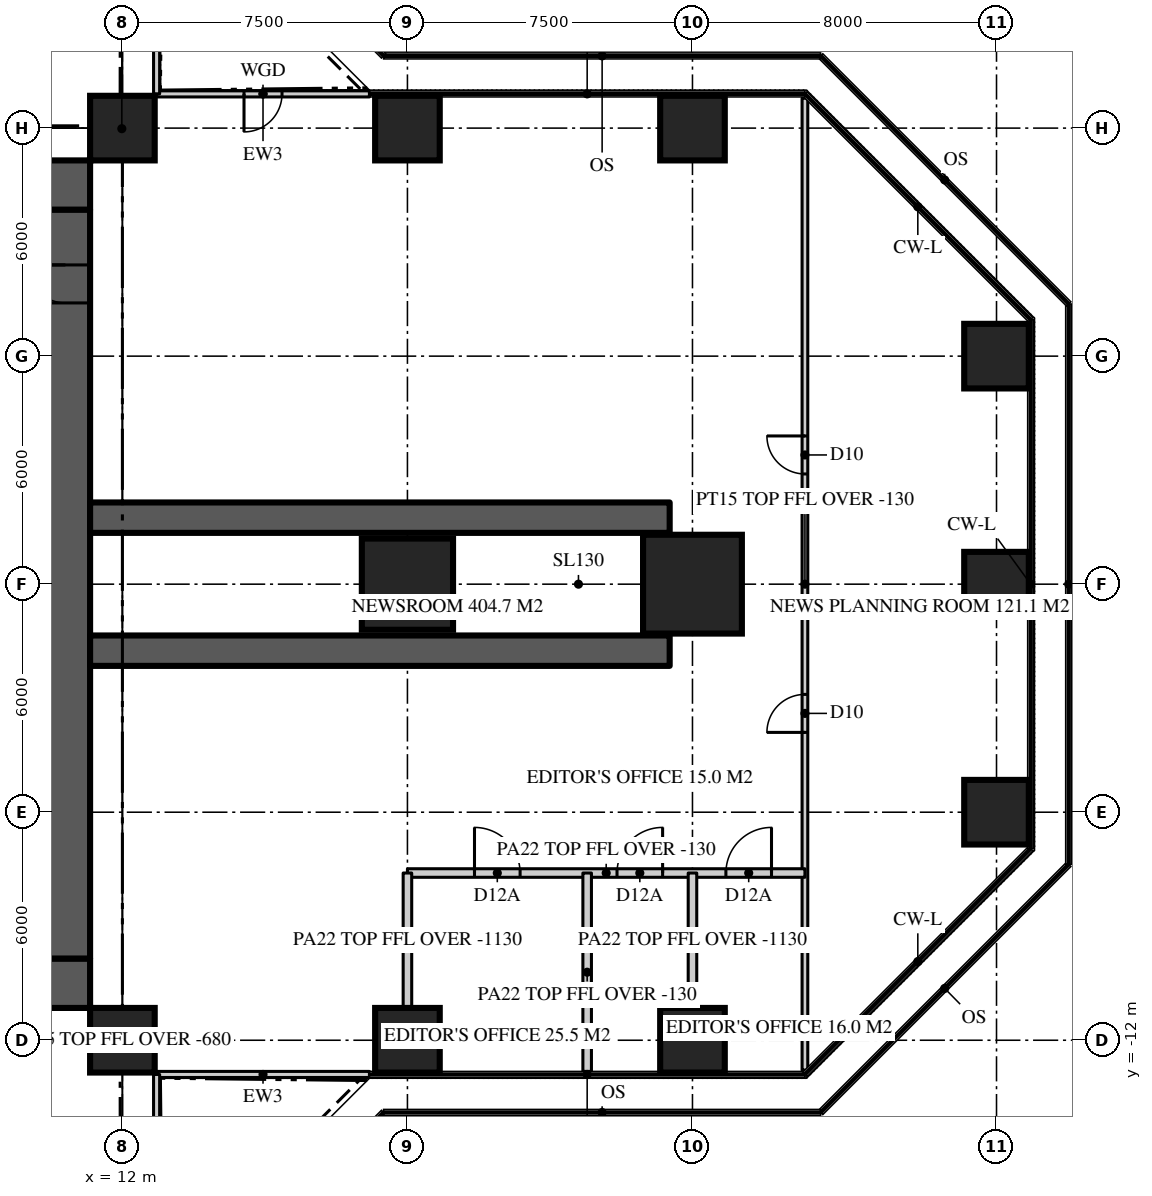
"""IFC4 building model, lengths in metres.
Left out: names, types, materials, properties, quantities, classifications, styles, units other than length and angle.
Written with IfcOpenShell. Run it as: python <this file> out.ifc"""

import sys

from ifc_helpers import new_model, si_unit, direction, frame, frame_2d, origin, origin_2d, place, context, subcontext, project, spatial, rectangle, extrude, element, fill, save


model = new_model("IFC4")
c1 = context("Model", 3, precision=1e-05, world=origin(), true_north=direction((0.0, 1.0)))
c2 = subcontext(c1, "Body", "Model", "MODEL_VIEW")
j1 = project(units=[si_unit("LENGTHUNIT", "METRE"), si_unit("PLANEANGLEUNIT", "RADIAN")], contexts=[c1])
p1 = place(None, origin())
s1 = spatial("IfcSite", under=j1, at=p1, CompositionType="ELEMENT")
p2 = place(p1, origin())
s2 = spatial("IfcBuilding", under=s1, at=p2, CompositionType="ELEMENT")
p3 = place(p2, frame((0.0, 0.0, 43.5)))
s3 = spatial("IfcBuildingStorey", under=s2, at=p3, CompositionType="ELEMENT", Elevation=43.5)
p4 = place(p3, frame((-11.15, 10.5, 0.0), z_axis=(0.0, 0.0, 1.0), x_axis=(1.0, 0.0, 0.0)))
e1 = element("IfcWall", 1, at=p4, inside=s3, PredefinedType="SHEAR", context=c2, shape_type="SweptSolid", body=[
    extrude(rectangle(XDim=22.3, YDim=1.3, at=frame_2d((11.15, 0.0))), origin(), (0.0, 0.0, 1.0), 3.9),
])
p5 = place(p4, frame((4.25, 0.0, 0.0)))
e2 = element("IfcOpeningElement", 2, at=p5, cuts=e1, PredefinedType="OPENING", context=c2, shape_type="SweptSolid", body=[
    extrude(rectangle(XDim=1.8, YDim=2.2, at=frame_2d((0.9, 1.1))), frame((0.0, 0.66, 0.0), z_axis=(0.0, -1.0, 0.0), x_axis=(1.0, 0.0, 0.0)), (0.0, 0.0, 1.0), 1.32),
])
p6 = place(p4, frame((16.25, 0.0, 0.0)))
e3 = element("IfcOpeningElement", 3, at=p6, cuts=e1, PredefinedType="OPENING", context=c2, shape_type="SweptSolid", body=[
    extrude(rectangle(XDim=1.8, YDim=2.2, at=frame_2d((0.9, 1.1))), frame((0.0, 0.66, 0.0), z_axis=(0.0, -1.0, 0.0), x_axis=(1.0, 0.0, 0.0)), (0.0, 0.0, 1.0), 1.32),
])
p7 = place(p3, frame((11.15, -10.5, 0.0), z_axis=(0.0, 0.0, 1.0), x_axis=(-1.0, 0.0, 0.0)))
e4 = element("IfcWall", 4, at=p7, inside=s3, PredefinedType="SHEAR", context=c2, shape_type="SweptSolid", body=[
    extrude(rectangle(XDim=22.3, YDim=1.3, at=frame_2d((11.15, 0.0))), origin(), (0.0, 0.0, 1.0), 3.9),
])
p8 = place(p7, frame((16.25, 0.0, 0.0)))
e5 = element("IfcOpeningElement", 5, at=p8, cuts=e4, PredefinedType="OPENING", context=c2, shape_type="SweptSolid", body=[
    extrude(rectangle(XDim=1.8, YDim=2.2, at=frame_2d((0.9, 1.1))), frame((0.0, 0.66, 0.0), z_axis=(0.0, -1.0, 0.0), x_axis=(1.0, 0.0, 0.0)), (0.0, 0.0, 1.0), 1.32),
])
p9 = place(p7, frame((4.25, 0.0, 0.0)))
e6 = element("IfcOpeningElement", 6, at=p9, cuts=e4, PredefinedType="OPENING", context=c2, shape_type="SweptSolid", body=[
    extrude(rectangle(XDim=1.8, YDim=2.2, at=frame_2d((0.9, 1.1))), frame((0.0, 0.66, 0.0), z_axis=(0.0, -1.0, 0.0), x_axis=(1.0, 0.0, 0.0)), (0.0, 0.0, 1.0), 1.32),
])
p10 = place(p3, frame((10.5, -9.85, 0.0), z_axis=(0.0, 0.0, 1.0), x_axis=(0.0, 1.0, 0.0)))
e7 = element("IfcWall", 7, at=p10, inside=s3, PredefinedType="SHEAR", context=c2, shape_type="SweptSolid", body=[
    extrude(rectangle(XDim=19.7, YDim=1.3, at=frame_2d((9.85, 0.0))), origin(), (0.0, 0.0, 1.0), 3.9),
])
p11 = place(p10, frame((17.25, 0.0, 0.0)))
e8 = element("IfcOpeningElement", 8, at=p11, cuts=e7, PredefinedType="OPENING", context=c2, shape_type="SweptSolid", body=[
    extrude(rectangle(XDim=1.0, YDim=2.2, at=frame_2d((0.5, 1.1))), frame((0.0, 0.66, 0.0), z_axis=(0.0, -1.0, 0.0), x_axis=(1.0, 0.0, 0.0)), (0.0, 0.0, 1.0), 1.32),
])
for number, where, z_axis, x_axis in (
    (9, (11.15, -1.75, 0.0), (0.0, 0.0, 1.0), (1.0, 0.0, 0.0)),
    (10, (11.15, 1.75, 0.0), (0.0, 0.0, 1.0), (1.0, 0.0, 0.0)),
):
    element("IfcWall", number, at=place(p3, frame(where, z_axis=z_axis, x_axis=x_axis)), inside=s3, PredefinedType="SHEAR", context=c2, shape_type="SweptSolid", body=[
        extrude(rectangle(XDim=15.25, YDim=0.8, at=frame_2d((7.625, 0.0))), origin(), (0.0, 0.0, 1.0), 3.9),
    ])
for number, where, z_axis, x_axis in (
    (11, (12.0, -12.0, 0.0), (0.0, 0.0, 1.0), (1.0, 0.0, 0.0)),
    (12, (19.5, -12.0, 0.0), (0.0, 0.0, 1.0), (1.0, 0.0, 0.0)),
    (13, (27.0, -12.0, 0.0), (0.0, 0.0, 1.0), (1.0, 0.0, 0.0)),
    (14, (35.0, -6.0, 0.0), (0.0, 0.0, 1.0), (1.0, 0.0, 0.0)),
):
    element("IfcColumn", number, at=place(p3, frame(where, z_axis=z_axis, x_axis=x_axis)), inside=s3, PredefinedType="COLUMN", context=c2, shape_type="SweptSolid", body=[
        extrude(rectangle(XDim=1.7, YDim=1.7, at=origin_2d()), origin(), (0.0, 0.0, 1.0), 3.9),
    ])
p12 = place(p3, frame((19.5, 0.0, 0.0), z_axis=(0.0, 0.0, 1.0), x_axis=(1.0, 0.0, 0.0)))
e15 = element("IfcColumn", 15, at=p12, inside=s3, PredefinedType="COLUMN", context=c2, shape_type="SweptSolid", body=[
    extrude(rectangle(XDim=2.4, YDim=2.4, at=origin_2d()), origin(), (0.0, 0.0, 1.0), 3.9),
])
p13 = place(p3, frame((27.0, 0.0, 0.0), z_axis=(0.0, 0.0, 1.0), x_axis=(1.0, 0.0, 0.0)))
e16 = element("IfcColumn", 16, at=p13, inside=s3, PredefinedType="COLUMN", context=c2, shape_type="SweptSolid", body=[
    extrude(rectangle(XDim=2.6, YDim=2.6, at=origin_2d()), origin(), (0.0, 0.0, 1.0), 3.9),
])
for number, where, z_axis, x_axis in (
    (17, (35.0, 0.0, 0.0), (0.0, 0.0, 1.0), (1.0, 0.0, 0.0)),
    (18, (35.0, 6.0, 0.0), (0.0, 0.0, 1.0), (1.0, 0.0, 0.0)),
    (19, (12.0, 12.0, 0.0), (0.0, 0.0, 1.0), (1.0, 0.0, 0.0)),
    (20, (19.5, 12.0, 0.0), (0.0, 0.0, 1.0), (1.0, 0.0, 0.0)),
    (21, (27.0, 12.0, 0.0), (0.0, 0.0, 1.0), (1.0, 0.0, 0.0)),
):
    element("IfcColumn", number, at=place(p3, frame(where, z_axis=z_axis, x_axis=x_axis)), inside=s3, PredefinedType="COLUMN", context=c2, shape_type="SweptSolid", body=[
        extrude(rectangle(XDim=1.7, YDim=1.7, at=origin_2d()), origin(), (0.0, 0.0, 1.0), 3.9),
    ])
p14 = place(p3, frame((12.9, -12.9, 0.0), z_axis=(0.0, 0.0, 1.0), x_axis=(1.0, 0.0, 0.0)))
e22 = element("IfcWall", 22, at=p14, inside=s3, PredefinedType="SOLIDWALL", context=c2, shape_type="SweptSolid", body=[
    extrude(rectangle(XDim=5.6, YDim=0.16, at=frame_2d((2.8, 0.0))), origin(), (0.0, 0.0, 1.0), 3.77),
])
p15 = place(p3, frame((18.5, 12.9, 0.0), z_axis=(0.0, 0.0, 1.0), x_axis=(-1.0, 0.0, 0.0)))
e23 = element("IfcWall", 23, at=p15, inside=s3, PredefinedType="SOLIDWALL", context=c2, shape_type="SweptSolid", body=[
    extrude(rectangle(XDim=5.6, YDim=0.16, at=frame_2d((2.8, 0.0))), origin(), (0.0, 0.0, 1.0), 3.77),
])
p16 = place(p15, frame((2.3, 0.0, 0.0)))
e24 = element("IfcOpeningElement", 24, at=p16, cuts=e23, PredefinedType="OPENING", context=c2, shape_type="SweptSolid", body=[
    extrude(rectangle(XDim=1.0, YDim=2.2, at=frame_2d((0.5, 1.1))), frame((0.0, 0.09, 0.0), z_axis=(0.0, -1.0, 0.0), x_axis=(1.0, 0.0, 0.0)), (0.0, 0.0, 1.0), 0.18),
])
p17 = place(p3, frame((12.9, 12.9, 0.0), z_axis=(0.0, 0.0, 1.0), x_axis=(0.0, 1.0, 0.0)))
e25 = element("IfcWall", 25, at=p17, inside=s3, PredefinedType="SOLIDWALL", context=c2, shape_type="SweptSolid", body=[
    extrude(rectangle(XDim=5.6, YDim=0.16, at=frame_2d((2.8, 0.0))), origin(), (0.0, 0.0, 1.0), 3.77),
])
p18 = place(p3, frame((12.9, -18.5, 0.0), z_axis=(0.0, 0.0, 1.0), x_axis=(0.0, 1.0, 0.0)))
e26 = element("IfcWall", 26, at=p18, inside=s3, PredefinedType="SOLIDWALL", context=c2, shape_type="SweptSolid", body=[
    extrude(rectangle(XDim=5.6, YDim=0.16, at=frame_2d((2.8, 0.0))), origin(), (0.0, 0.0, 1.0), 3.77),
])
p19 = place(p18, frame((2.3, 0.0, 0.0)))
e27 = element("IfcOpeningElement", 27, at=p19, cuts=e26, PredefinedType="OPENING", context=c2, shape_type="SweptSolid", body=[
    extrude(rectangle(XDim=1.0, YDim=2.2, at=frame_2d((0.5, 1.1))), frame((0.0, 0.09, 0.0), z_axis=(0.0, -1.0, 0.0), x_axis=(1.0, 0.0, 0.0)), (0.0, 0.0, 1.0), 0.18),
])
p20 = place(p3, frame((29.959, -12.786, 0.0), z_axis=(0.0, 0.0, 1.0), x_axis=(0.0, 1.0, 0.0)))
e28 = element("IfcWall", 28, at=p20, inside=s3, PredefinedType="PARTITIONING", context=c2, shape_type="SweptSolid", body=[
    extrude(rectangle(XDim=25.573, YDim=0.15, at=frame_2d((12.786, 0.0))), origin(), (0.0, 0.0, 1.0), 3.77),
])
p21 = place(p20, frame((15.687, 0.0, 0.0)))
e29 = element("IfcOpeningElement", 29, at=p21, cuts=e28, PredefinedType="OPENING", context=c2, shape_type="SweptSolid", body=[
    extrude(rectangle(XDim=1.0, YDim=2.2, at=frame_2d((0.5, 1.1))), frame((0.0, 0.085, 0.0), z_axis=(0.0, -1.0, 0.0), x_axis=(1.0, 0.0, 0.0)), (0.0, 0.0, 1.0), 0.17),
])
p22 = place(p20, frame((8.886, 0.0, 0.0)))
e30 = element("IfcOpeningElement", 30, at=p22, cuts=e28, PredefinedType="OPENING", context=c2, shape_type="SweptSolid", body=[
    extrude(rectangle(XDim=1.0, YDim=2.2, at=frame_2d((0.5, 1.1))), frame((0.0, 0.085, 0.0), z_axis=(0.0, -1.0, 0.0), x_axis=(1.0, 0.0, 0.0)), (0.0, 0.0, 1.0), 0.17),
])
p23 = place(p3, frame((19.5, -7.6, 0.0), z_axis=(0.0, 0.0, 1.0), x_axis=(1.0, 0.0, 0.0)))
e31 = element("IfcWall", 31, at=p23, inside=s3, PredefinedType="PARTITIONING", context=c2, shape_type="SweptSolid", body=[
    extrude(rectangle(XDim=10.459, YDim=0.225, at=frame_2d((5.229, 0.0))), origin(), (0.0, 0.0, 1.0), 3.77),
])
p24 = place(p23, frame((1.764, 0.0, 0.0)))
e32 = element("IfcOpeningElement", 32, at=p24, cuts=e31, PredefinedType="OPENING", context=c2, shape_type="SweptSolid", body=[
    extrude(rectangle(XDim=1.2, YDim=2.2, at=frame_2d((0.6, 1.1))), frame((0.0, 0.123, 0.0), z_axis=(0.0, -1.0, 0.0), x_axis=(1.0, 0.0, 0.0)), (0.0, 0.0, 1.0), 0.245),
])
p25 = place(p23, frame((5.514, 0.0, 0.0)))
e33 = element("IfcOpeningElement", 33, at=p25, cuts=e31, PredefinedType="OPENING", context=c2, shape_type="SweptSolid", body=[
    extrude(rectangle(XDim=1.2, YDim=2.2, at=frame_2d((0.6, 1.1))), frame((0.0, 0.123, 0.0), z_axis=(0.0, -1.0, 0.0), x_axis=(1.0, 0.0, 0.0)), (0.0, 0.0, 1.0), 0.245),
])
p26 = place(p23, frame((8.379, 0.0, 0.0)))
e34 = element("IfcOpeningElement", 34, at=p26, cuts=e31, PredefinedType="OPENING", context=c2, shape_type="SweptSolid", body=[
    extrude(rectangle(XDim=1.2, YDim=2.2, at=frame_2d((0.6, 1.1))), frame((0.0, 0.123, 0.0), z_axis=(0.0, -1.0, 0.0), x_axis=(1.0, 0.0, 0.0)), (0.0, 0.0, 1.0), 0.245),
])
p27 = place(p3, frame((19.5, -7.6, 0.0), z_axis=(0.0, 0.0, 1.0), x_axis=(0.0, -1.0, 0.0)))
e35 = element("IfcWall", 35, at=p27, inside=s3, PredefinedType="PARTITIONING", context=c2, shape_type="SweptSolid", body=[
    extrude(rectangle(XDim=3.55, YDim=0.225, at=frame_2d((1.775, 0.0))), origin(), (0.0, 0.0, 1.0), 2.77),
])
p28 = place(p3, frame((24.229, -7.6, 0.0), z_axis=(0.0, 0.0, 1.0), x_axis=(0.0, -1.0, 0.0)))
e36 = element("IfcWall", 36, at=p28, inside=s3, PredefinedType="PARTITIONING", context=c2, shape_type="SweptSolid", body=[
    extrude(rectangle(XDim=5.22, YDim=0.225, at=frame_2d((2.61, 0.0))), origin(), (0.0, 0.0, 1.0), 3.77),
])
p29 = place(p3, frame((27.0, -7.6, 0.0), z_axis=(0.0, 0.0, 1.0), x_axis=(0.0, -1.0, 0.0)))
e37 = element("IfcWall", 37, at=p29, inside=s3, PredefinedType="PARTITIONING", context=c2, shape_type="SweptSolid", body=[
    extrude(rectangle(XDim=3.55, YDim=0.225, at=frame_2d((1.775, 0.0))), origin(), (0.0, 0.0, 1.0), 2.77),
])
for number, where, z_axis, x_axis in (
    (38, (11.15, 11.15, 0.0), (0.0, 0.0, 1.0), (0.707, 0.707, 0.0)),
    (39, (11.15, -11.15, 0.0), (0.0, 0.0, 1.0), (0.707, -0.707, 0.0)),
):
    element("IfcWall", number, at=place(p3, frame(where, z_axis=z_axis, x_axis=x_axis)), inside=s3, PredefinedType="PARTITIONING", context=c2, shape_type="SweptSolid", body=[
        extrude(rectangle(XDim=2.362, YDim=0.15, at=frame_2d((1.181, 0.0))), origin(), (0.0, 0.0, 1.0), 3.22),
    ])
p30 = place(p16, origin())
e40 = element("IfcDoor", 40, at=p30, inside=s3, OperationType="SINGLE_SWING_RIGHT", PredefinedType="DOOR", context=c2, shape_type="SweptSolid", body=[
    extrude(rectangle(XDim=1.0, YDim=2.2, at=frame_2d((0.5, 1.1))), frame((0.0, 0.025, 0.0), z_axis=(0.0, -1.0, 0.0), x_axis=(1.0, 0.0, 0.0)), (0.0, 0.0, 1.0), 0.05),
])
fill(e24, e40)
p31 = place(p11, origin())
e41 = element("IfcDoor", 41, at=p31, inside=s3, OperationType="SINGLE_SWING_RIGHT", PredefinedType="DOOR", context=c2, shape_type="SweptSolid", body=[
    extrude(rectangle(XDim=1.0, YDim=2.2, at=frame_2d((0.5, 1.1))), frame((0.0, 0.025, 0.0), z_axis=(0.0, -1.0, 0.0), x_axis=(1.0, 0.0, 0.0)), (0.0, 0.0, 1.0), 0.05),
])
fill(e8, e41)
p32 = place(p21, origin())
e42 = element("IfcDoor", 42, at=p32, inside=s3, OperationType="SINGLE_SWING_RIGHT", PredefinedType="DOOR", context=c2, shape_type="SweptSolid", body=[
    extrude(rectangle(XDim=1.0, YDim=2.2, at=frame_2d((0.5, 1.1))), frame((0.0, 0.025, 0.0), z_axis=(0.0, -1.0, 0.0), x_axis=(1.0, 0.0, 0.0)), (0.0, 0.0, 1.0), 0.05),
])
fill(e29, e42)
p33 = place(p22, origin())
e43 = element("IfcDoor", 43, at=p33, inside=s3, OperationType="SINGLE_SWING_LEFT", PredefinedType="DOOR", context=c2, shape_type="SweptSolid", body=[
    extrude(rectangle(XDim=1.0, YDim=2.2, at=frame_2d((0.5, 1.1))), frame((0.0, 0.025, 0.0), z_axis=(0.0, -1.0, 0.0), x_axis=(1.0, 0.0, 0.0)), (0.0, 0.0, 1.0), 0.05),
])
fill(e30, e43)
p34 = place(p24, origin())
e44 = element("IfcDoor", 44, at=p34, inside=s3, OperationType="SINGLE_SWING_LEFT", PredefinedType="DOOR", context=c2, shape_type="SweptSolid", body=[
    extrude(rectangle(XDim=1.2, YDim=2.2, at=frame_2d((0.6, 1.1))), frame((0.0, 0.025, 0.0), z_axis=(0.0, -1.0, 0.0), x_axis=(1.0, 0.0, 0.0)), (0.0, 0.0, 1.0), 0.05),
])
fill(e32, e44)
p35 = place(p25, origin())
e45 = element("IfcDoor", 45, at=p35, inside=s3, OperationType="SINGLE_SWING_RIGHT", PredefinedType="DOOR", context=c2, shape_type="SweptSolid", body=[
    extrude(rectangle(XDim=1.2, YDim=2.2, at=frame_2d((0.6, 1.1))), frame((0.0, 0.025, 0.0), z_axis=(0.0, -1.0, 0.0), x_axis=(1.0, 0.0, 0.0)), (0.0, 0.0, 1.0), 0.05),
])
fill(e33, e45)
p36 = place(p26, origin())
e46 = element("IfcDoor", 46, at=p36, inside=s3, OperationType="SINGLE_SWING_RIGHT", PredefinedType="DOOR", context=c2, shape_type="SweptSolid", body=[
    extrude(rectangle(XDim=1.2, YDim=2.2, at=frame_2d((0.6, 1.1))), frame((0.0, 0.025, 0.0), z_axis=(0.0, -1.0, 0.0), x_axis=(1.0, 0.0, 0.0)), (0.0, 0.0, 1.0), 0.05),
])
fill(e34, e46)
save(model, sys.argv[1])
